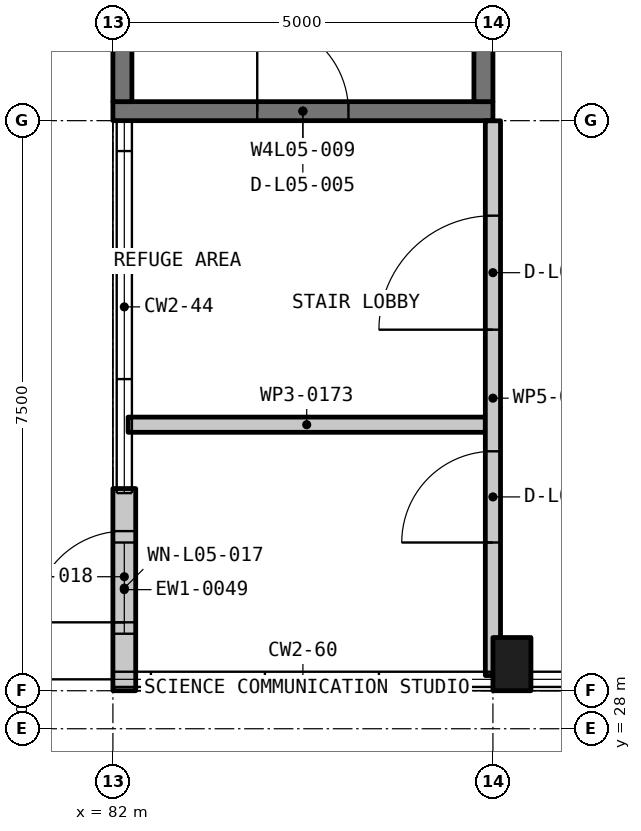
"""IFC4 building model, lengths in metres.
Left out: names, types, materials, properties, quantities, classifications, styles, units other than length and angle.
Written with IfcOpenShell. Run it as: python <this file> out.ifc"""

import sys

from ifc_helpers import new_model, si_unit, direction, frame, frame_2d, origin, origin_2d, place, context, subcontext, project, spatial, rectangle, extrude, element, fill, save


model = new_model("IFC4")
c1 = context("Model", 3, precision=1e-05, world=origin(), true_north=direction((0.0, 1.0)))
c2 = subcontext(c1, "Body", "Model", "MODEL_VIEW")
j1 = project(units=[si_unit("LENGTHUNIT", "METRE"), si_unit("PLANEANGLEUNIT", "RADIAN")], contexts=[c1])
p1 = place(None, origin())
s1 = spatial("IfcSite", under=j1, at=p1, CompositionType="ELEMENT")
p2 = place(p1, origin())
s2 = spatial("IfcBuilding", under=s1, at=p2, CompositionType="ELEMENT")
p3 = place(p2, frame((0.0, 0.0, 24.75)))
s3 = spatial("IfcBuildingStorey", under=s2, at=p3, CompositionType="ELEMENT", Elevation=24.75)
p4 = place(p3, frame((87.25, 28.85, -0.3), z_axis=(0.0, 0.0, 1.0), x_axis=(1.0, 0.0, 0.0)))
e1 = element("IfcColumn", 1, at=p4, inside=s3, PredefinedType="COLUMN", context=c2, shape_type="SweptSolid", body=[
    extrude(rectangle(XDim=0.5, YDim=0.7, at=origin_2d()), origin(), (0.0, 0.0, 1.0), 4.5),
])
p5 = place(p3, frame((82.0, 36.125, -0.3), z_axis=(0.0, 0.0, 1.0), x_axis=(1.0, 0.0, 0.0)))
e2 = element("IfcWall", 2, at=p5, inside=s3, PredefinedType="SHEAR", context=c2, shape_type="SweptSolid", body=[
    extrude(rectangle(XDim=5.0, YDim=0.25, at=frame_2d((2.5, 0.0))), origin(), (0.0, 0.0, 1.0), 4.5),
])
p6 = place(p5, frame((1.899, 0.0, 0.3)))
e3 = element("IfcOpeningElement", 3, at=p6, cuts=e2, PredefinedType="OPENING", context=c2, shape_type="SweptSolid", body=[
    extrude(rectangle(XDim=1.2, YDim=2.2, at=frame_2d((0.6, 1.1))), frame((0.0, 0.135, 0.0), z_axis=(0.0, -1.0, 0.0), x_axis=(1.0, 0.0, 0.0)), (0.0, 0.0, 1.0), 0.27),
])
for number, where, z_axis, x_axis in (
    (4, (86.875, 36.25, -0.3), (0.0, 0.0, 1.0), (0.0, 1.0, 0.0)),
    (5, (82.125, 36.25, -0.3), (0.0, 0.0, 1.0), (0.0, 1.0, 0.0)),
):
    element("IfcWall", number, at=place(p3, frame(where, z_axis=z_axis, x_axis=x_axis)), inside=s3, PredefinedType="SHEAR", context=c2, shape_type="SweptSolid", body=[
        extrude(rectangle(XDim=7.0, YDim=0.25, at=frame_2d((3.5, 0.0))), origin(), (0.0, 0.0, 1.0), 4.5),
    ])
p7 = place(p3, frame((82.15, 28.5, 0.0), z_axis=(0.0, 0.0, 1.0), x_axis=(0.0, 1.0, 0.0)))
e6 = element("IfcWall", 6, at=p7, inside=s3, PredefinedType="SOLIDWALL", context=c2, shape_type="SweptSolid", body=[
    extrude(rectangle(XDim=2.66, YDim=0.3, at=frame_2d((1.33, 0.0))), origin(), (0.0, 0.0, 1.0), 4.2),
])
p8 = place(p7, frame((0.9, 0.0, 0.0)))
e7 = element("IfcOpeningElement", 7, at=p8, cuts=e6, PredefinedType="OPENING", context=c2, shape_type="SweptSolid", body=[
    extrude(rectangle(XDim=1.2, YDim=2.2, at=frame_2d((0.6, 1.1))), frame((0.0, 0.16, 0.0), z_axis=(0.0, -1.0, 0.0), x_axis=(1.0, 0.0, 0.0)), (0.0, 0.0, 1.0), 0.32),
])
p9 = place(p7, frame((0.75, 0.0, 2.4)))
e8 = element("IfcOpeningElement", 8, at=p9, cuts=e6, PredefinedType="OPENING", context=c2, shape_type="SweptSolid", body=[
    extrude(rectangle(XDim=1.2, YDim=0.6, at=frame_2d((0.6, 0.3))), frame((0.0, 0.16, 0.0), z_axis=(0.0, -1.0, 0.0), x_axis=(1.0, 0.0, 0.0)), (0.0, 0.0, 1.0), 0.32),
])
p10 = place(p3, frame((82.2, 32.0, 0.0), z_axis=(0.0, 0.0, 1.0), x_axis=(1.0, 0.0, 0.0)))
e9 = element("IfcWall", 9, at=p10, inside=s3, PredefinedType="PARTITIONING", context=c2, shape_type="SweptSolid", body=[
    extrude(rectangle(XDim=4.7, YDim=0.2, at=frame_2d((2.35, 0.0))), origin(), (0.0, 0.0, 1.0), 4.2),
])
p11 = place(p3, frame((87.0, 28.7, 0.0), z_axis=(0.0, 0.0, 1.0), x_axis=(0.0, 1.0, 0.0)))
e10 = element("IfcWall", 10, at=p11, inside=s3, PredefinedType="PARTITIONING", context=c2, shape_type="SweptSolid", body=[
    extrude(rectangle(XDim=7.298, YDim=0.2, at=frame_2d((3.649, 0.0))), origin(), (0.0, 0.0, 1.0), 3.4),
])
p12 = place(p11, frame((4.55, 0.0, 0.0)))
e11 = element("IfcOpeningElement", 11, at=p12, cuts=e10, PredefinedType="OPENING", context=c2, shape_type="SweptSolid", body=[
    extrude(rectangle(XDim=1.5, YDim=2.1, at=frame_2d((0.75, 1.05))), frame((0.0, 0.11, 0.0), z_axis=(0.0, -1.0, 0.0), x_axis=(1.0, 0.0, 0.0)), (0.0, 0.0, 1.0), 0.22),
])
p13 = place(p11, frame((1.75, 0.0, 0.0)))
e12 = element("IfcOpeningElement", 12, at=p13, cuts=e10, PredefinedType="OPENING", context=c2, shape_type="SweptSolid", body=[
    extrude(rectangle(XDim=1.2, YDim=2.1, at=frame_2d((0.6, 1.05))), frame((0.0, 0.11, 0.0), z_axis=(0.0, -1.0, 0.0), x_axis=(1.0, 0.0, 0.0)), (0.0, 0.0, 1.0), 0.22),
])
p14 = place(p8, origin())
e13 = element("IfcDoor", 13, at=p14, inside=s3, OperationType="SINGLE_SWING_LEFT", PredefinedType="DOOR", context=c2, shape_type="SweptSolid", body=[
    extrude(rectangle(XDim=1.2, YDim=2.2, at=frame_2d((0.6, 1.1))), frame((0.0, 0.025, 0.0), z_axis=(0.0, -1.0, 0.0), x_axis=(1.0, 0.0, 0.0)), (0.0, 0.0, 1.0), 0.05),
])
fill(e7, e13)
p15 = place(p9, origin())
e14 = element("IfcWindow", 14, at=p15, inside=s3, PartitioningType="SINGLE_PANEL", PredefinedType="WINDOW", context=c2, shape_type="SweptSolid", body=[
    extrude(rectangle(XDim=1.2, YDim=0.6, at=frame_2d((0.6, 0.3))), frame((0.0, 0.03, 0.0), z_axis=(0.0, -1.0, 0.0), x_axis=(1.0, 0.0, 0.0)), (0.0, 0.0, 1.0), 0.06),
])
fill(e8, e14)
p16 = place(p6, origin())
e15 = element("IfcDoor", 15, at=p16, inside=s3, OperationType="SINGLE_SWING_RIGHT", PredefinedType="DOOR", context=c2, shape_type="SweptSolid", body=[
    extrude(rectangle(XDim=1.2, YDim=2.2, at=frame_2d((0.6, 1.1))), frame((0.0, 0.025, 0.0), z_axis=(0.0, -1.0, 0.0), x_axis=(1.0, 0.0, 0.0)), (0.0, 0.0, 1.0), 0.05),
])
fill(e3, e15)
p17 = place(p12, origin())
e16 = element("IfcDoor", 16, at=p17, inside=s3, OperationType="DOUBLE_DOOR_SINGLE_SWING", PredefinedType="DOOR", context=c2, shape_type="SweptSolid", body=[
    extrude(rectangle(XDim=1.5, YDim=2.1, at=frame_2d((0.75, 1.05))), frame((0.0, 0.025, 0.0), z_axis=(0.0, -1.0, 0.0), x_axis=(1.0, 0.0, 0.0)), (0.0, 0.0, 1.0), 0.05),
])
fill(e11, e16)
p18 = place(p13, origin())
e17 = element("IfcDoor", 17, at=p18, inside=s3, OperationType="SINGLE_SWING_RIGHT", PredefinedType="DOOR", context=c2, shape_type="SweptSolid", body=[
    extrude(rectangle(XDim=1.2, YDim=2.1, at=frame_2d((0.6, 1.05))), frame((0.0, 0.025, 0.0), z_axis=(0.0, -1.0, 0.0), x_axis=(1.0, 0.0, 0.0)), (0.0, 0.0, 1.0), 0.05),
])
fill(e12, e17)
save(model, sys.argv[1])
